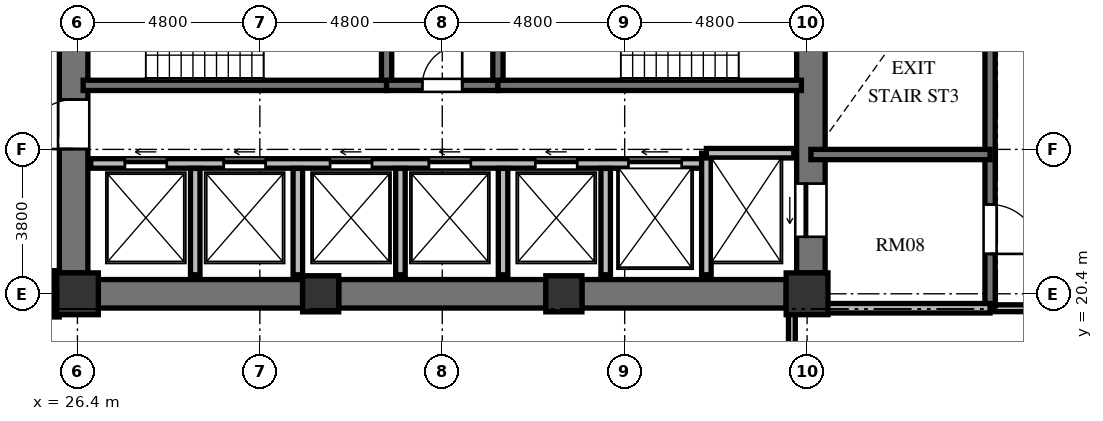
"""IFC4 building model, lengths in metres.
Left out: names, types, materials, properties, quantities, classifications, styles, units other than length and angle.
Written with IfcOpenShell. Run it as: python <this file> out.ifc"""

import sys

from ifc_helpers import new_model, si_unit, direction, frame, frame_2d, origin, origin_2d, place, context, subcontext, project, spatial, rectangle, extrude, element, fill, save


model = new_model("IFC4")
c1 = context("Model", 3, precision=1e-05, world=origin(), true_north=direction((0.0, 1.0)))
c2 = subcontext(c1, "Body", "Model", "MODEL_VIEW")
j1 = project(units=[si_unit("LENGTHUNIT", "METRE"), si_unit("PLANEANGLEUNIT", "RADIAN")], contexts=[c1])
p1 = place(None, origin())
s1 = spatial("IfcSite", under=j1, at=p1, CompositionType="ELEMENT")
p2 = place(p1, origin())
s2 = spatial("IfcBuilding", under=s1, at=p2, CompositionType="ELEMENT")
p3 = place(p2, frame((0.0, 0.0, 125.52)))
s3 = spatial("IfcBuildingStorey", under=s2, at=p3, CompositionType="ELEMENT", Elevation=125.52)
p4 = place(p3, frame((26.4, 20.4, 0.0), z_axis=(0.0, 0.0, 1.0), x_axis=(1.0, 0.0, 0.0)))
e1 = element("IfcColumn", 1, at=p4, inside=s3, PredefinedType="COLUMN", context=c2, shape_type="SweptSolid", body=[
    extrude(rectangle(XDim=1.1, YDim=1.1, at=origin_2d()), origin(), (0.0, 0.0, 1.0), 3.648),
])
for number, where, z_axis, x_axis in (
    (2, (32.8, 20.4, 0.0), (0.0, 0.0, 1.0), (1.0, 0.0, 0.0)),
    (3, (39.2, 20.4, 0.0), (0.0, 0.0, 1.0), (1.0, 0.0, 0.0)),
):
    element("IfcColumn", number, at=place(p3, frame(where, z_axis=z_axis, x_axis=x_axis)), inside=s3, PredefinedType="COLUMN", context=c2, shape_type="SweptSolid", body=[
        extrude(rectangle(XDim=0.95, YDim=0.95, at=origin_2d()), origin(), (0.0, 0.0, 1.0), 3.648),
    ])
p5 = place(p3, frame((45.6, 20.4, 0.0), z_axis=(0.0, 0.0, 1.0), x_axis=(1.0, 0.0, 0.0)))
e4 = element("IfcColumn", 4, at=p5, inside=s3, PredefinedType="COLUMN", context=c2, shape_type="SweptSolid", body=[
    extrude(rectangle(XDim=1.1, YDim=1.1, at=origin_2d()), origin(), (0.0, 0.0, 1.0), 3.648),
])
p6 = place(p3, frame((26.3, 20.95, 0.0), z_axis=(0.0, 0.0, 1.0), x_axis=(0.0, 1.0, 0.0)))
e5 = element("IfcWall", 5, at=p6, inside=s3, PredefinedType="SHEAR", context=c2, shape_type="SweptSolid", body=[
    extrude(rectangle(XDim=14.1, YDim=0.75, at=frame_2d((7.05, 0.0))), origin(), (0.0, 0.0, 1.0), 3.648),
])
p7 = place(p6, frame((6.5, 0.0, 0.0)))
e6 = element("IfcOpeningElement", 6, at=p7, cuts=e5, PredefinedType="OPENING", context=c2, shape_type="SweptSolid", body=[
    extrude(rectangle(XDim=1.2, YDim=2.15, at=frame_2d((0.6, 1.075))), frame((0.0, 0.385, 0.0), z_axis=(0.0, -1.0, 0.0), x_axis=(1.0, 0.0, 0.0)), (0.0, 0.0, 1.0), 0.77),
])
p8 = place(p6, frame((9.6, 0.0, 0.0)))
e7 = element("IfcOpeningElement", 7, at=p8, cuts=e5, PredefinedType="OPENING", context=c2, shape_type="SweptSolid", body=[
    extrude(rectangle(XDim=1.3, YDim=2.2, at=frame_2d((0.65, 1.1))), frame((0.0, 0.385, 0.0), z_axis=(0.0, -1.0, 0.0), x_axis=(1.0, 0.0, 0.0)), (0.0, 0.0, 1.0), 0.77),
])
p9 = place(p6, frame((3.26, 0.0, 0.0)))
e8 = element("IfcOpeningElement", 8, at=p9, cuts=e5, PredefinedType="OPENING", context=c2, shape_type="SweptSolid", body=[
    extrude(rectangle(XDim=1.3, YDim=2.2, at=frame_2d((0.65, 1.1))), frame((0.0, 0.385, 0.0), z_axis=(0.0, -1.0, 0.0), x_axis=(1.0, 0.0, 0.0)), (0.0, 0.0, 1.0), 0.77),
])
p10 = place(p3, frame((45.7, 20.95, 0.0), z_axis=(0.0, 0.0, 1.0), x_axis=(0.0, 1.0, 0.0)))
e9 = element("IfcWall", 9, at=p10, inside=s3, PredefinedType="SHEAR", context=c2, shape_type="SweptSolid", body=[
    extrude(rectangle(XDim=14.1, YDim=0.75, at=frame_2d((7.05, 0.0))), origin(), (0.0, 0.0, 1.0), 3.648),
])
p11 = place(p10, frame((11.75, 0.0, 0.0)))
e10 = element("IfcOpeningElement", 10, at=p11, cuts=e9, PredefinedType="OPENING", context=c2, shape_type="SweptSolid", body=[
    extrude(rectangle(XDim=1.4, YDim=2.3, at=frame_2d((0.7, 1.15))), frame((0.0, 0.385, 0.0), z_axis=(0.0, -1.0, 0.0), x_axis=(1.0, 0.0, 0.0)), (0.0, 0.0, 1.0), 0.77),
])
p12 = place(p10, frame((0.95, 0.0, 0.0)))
e11 = element("IfcOpeningElement", 11, at=p12, cuts=e9, PredefinedType="OPENING", context=c2, shape_type="SweptSolid", body=[
    extrude(rectangle(XDim=1.4, YDim=2.3, at=frame_2d((0.7, 1.15))), frame((0.0, 0.385, 0.0), z_axis=(0.0, -1.0, 0.0), x_axis=(1.0, 0.0, 0.0)), (0.0, 0.0, 1.0), 0.77),
])
p13 = place(p3, frame((26.95, 20.4, 0.0), z_axis=(0.0, 0.0, 1.0), x_axis=(1.0, 0.0, 0.0)))
e12 = element("IfcWall", 12, at=p13, inside=s3, PredefinedType="SHEAR", context=c2, shape_type="SweptSolid", body=[
    extrude(rectangle(XDim=5.375, YDim=0.75, at=frame_2d((2.688, 0.0))), origin(), (0.0, 0.0, 1.0), 3.648),
])
p14 = place(p3, frame((33.275, 20.4, 0.0), z_axis=(0.0, 0.0, 1.0), x_axis=(1.0, 0.0, 0.0)))
e13 = element("IfcWall", 13, at=p14, inside=s3, PredefinedType="SHEAR", context=c2, shape_type="SweptSolid", body=[
    extrude(rectangle(XDim=5.45, YDim=0.75, at=frame_2d((2.725, 0.0))), origin(), (0.0, 0.0, 1.0), 3.648),
])
p15 = place(p3, frame((39.675, 20.4, 0.0), z_axis=(0.0, 0.0, 1.0), x_axis=(1.0, 0.0, 0.0)))
e14 = element("IfcWall", 14, at=p15, inside=s3, PredefinedType="SHEAR", context=c2, shape_type="SweptSolid", body=[
    extrude(rectangle(XDim=5.375, YDim=0.75, at=frame_2d((2.688, 0.0))), origin(), (0.0, 0.0, 1.0), 3.648),
])
p16 = place(p3, frame((26.55, 25.885, 0.0), z_axis=(0.0, 0.0, 1.0), x_axis=(1.0, 0.0, 0.0)))
e15 = element("IfcWall", 15, at=p16, inside=s3, PredefinedType="SHEAR", context=c2, shape_type="SweptSolid", body=[
    extrude(rectangle(XDim=7.985, YDim=0.27, at=frame_2d((3.992, 0.0))), origin(), (0.0, 0.0, 1.0), 3.648),
])
p17 = place(p3, frame((34.535, 25.885, 0.0), z_axis=(0.0, 0.0, 1.0), x_axis=(1.0, 0.0, 0.0)))
e16 = element("IfcWall", 16, at=p17, inside=s3, PredefinedType="SHEAR", context=c2, shape_type="SweptSolid", body=[
    extrude(rectangle(XDim=2.93, YDim=0.27, at=frame_2d((1.465, 0.0))), origin(), (0.0, 0.0, 1.0), 3.648),
])
p18 = place(p17, frame((0.94, 0.0, 0.0)))
e17 = element("IfcOpeningElement", 17, at=p18, cuts=e16, PredefinedType="OPENING", context=c2, shape_type="SweptSolid", body=[
    extrude(rectangle(XDim=1.05, YDim=2.15, at=frame_2d((0.525, 1.075))), frame((0.0, 0.145, 0.0), z_axis=(0.0, -1.0, 0.0), x_axis=(1.0, 0.0, 0.0)), (0.0, 0.0, 1.0), 0.29),
])
p19 = place(p3, frame((37.465, 25.885, 0.0), z_axis=(0.0, 0.0, 1.0), x_axis=(1.0, 0.0, 0.0)))
e18 = element("IfcWall", 18, at=p19, inside=s3, PredefinedType="SHEAR", context=c2, shape_type="SweptSolid", body=[
    extrude(rectangle(XDim=7.985, YDim=0.27, at=frame_2d((3.992, 0.0))), origin(), (0.0, 0.0, 1.0), 3.648),
])
for number, where, z_axis, x_axis in (
    (19, (34.535, 26.02, 0.0), (0.0, 0.0, 1.0), (0.0, 1.0, 0.0)),
    (20, (37.465, 26.02, 0.0), (0.0, 0.0, 1.0), (0.0, 1.0, 0.0)),
):
    element("IfcWall", number, at=place(p3, frame(where, z_axis=z_axis, x_axis=x_axis)), inside=s3, PredefinedType="SHEAR", context=c2, shape_type="SweptSolid", body=[
        extrude(rectangle(XDim=4.08, YDim=0.27, at=frame_2d((2.04, 0.0))), origin(), (0.0, 0.0, 1.0), 3.648),
    ])
p20 = place(p3, frame((26.75, 23.83, 0.0), z_axis=(0.0, 0.0, 1.0), x_axis=(1.0, 0.0, 0.0)))
e21 = element("IfcWall", 21, at=p20, inside=s3, PredefinedType="SOLIDWALL", context=c2, shape_type="SweptSolid", body=[
    extrude(rectangle(XDim=16.2, YDim=0.25, at=frame_2d((8.1, 0.0))), origin(), (0.0, 0.0, 1.0), 3.428),
])
p21 = place(p20, frame((0.9, 0.0, 0.0)))
e22 = element("IfcOpeningElement", 22, at=p21, cuts=e21, PredefinedType="OPENING", context=c2, shape_type="SweptSolid", body=[
    extrude(rectangle(XDim=1.1, YDim=2.2, at=frame_2d((0.55, 1.1))), frame((0.0, 0.135, 0.0), z_axis=(0.0, -1.0, 0.0), x_axis=(1.0, 0.0, 0.0)), (0.0, 0.0, 1.0), 0.27),
])
p22 = place(p20, frame((3.5, 0.0, 0.0)))
e23 = element("IfcOpeningElement", 23, at=p22, cuts=e21, PredefinedType="OPENING", context=c2, shape_type="SweptSolid", body=[
    extrude(rectangle(XDim=1.1, YDim=2.2, at=frame_2d((0.55, 1.1))), frame((0.0, 0.135, 0.0), z_axis=(0.0, -1.0, 0.0), x_axis=(1.0, 0.0, 0.0)), (0.0, 0.0, 1.0), 0.27),
])
p23 = place(p20, frame((6.3, 0.0, 0.0)))
e24 = element("IfcOpeningElement", 24, at=p23, cuts=e21, PredefinedType="OPENING", context=c2, shape_type="SweptSolid", body=[
    extrude(rectangle(XDim=1.1, YDim=2.2, at=frame_2d((0.55, 1.1))), frame((0.0, 0.135, 0.0), z_axis=(0.0, -1.0, 0.0), x_axis=(1.0, 0.0, 0.0)), (0.0, 0.0, 1.0), 0.27),
])
p24 = place(p20, frame((8.9, 0.0, 0.0)))
e25 = element("IfcOpeningElement", 25, at=p24, cuts=e21, PredefinedType="OPENING", context=c2, shape_type="SweptSolid", body=[
    extrude(rectangle(XDim=1.1, YDim=2.2, at=frame_2d((0.55, 1.1))), frame((0.0, 0.135, 0.0), z_axis=(0.0, -1.0, 0.0), x_axis=(1.0, 0.0, 0.0)), (0.0, 0.0, 1.0), 0.27),
])
p25 = place(p20, frame((11.7, 0.0, 0.0)))
e26 = element("IfcOpeningElement", 26, at=p25, cuts=e21, PredefinedType="OPENING", context=c2, shape_type="SweptSolid", body=[
    extrude(rectangle(XDim=1.1, YDim=2.2, at=frame_2d((0.55, 1.1))), frame((0.0, 0.135, 0.0), z_axis=(0.0, -1.0, 0.0), x_axis=(1.0, 0.0, 0.0)), (0.0, 0.0, 1.0), 0.27),
])
p26 = place(p20, frame((14.15, 0.0, 0.0)))
e27 = element("IfcOpeningElement", 27, at=p26, cuts=e21, PredefinedType="OPENING", context=c2, shape_type="SweptSolid", body=[
    extrude(rectangle(XDim=1.4, YDim=2.3, at=frame_2d((0.7, 1.15))), frame((0.0, 0.135, 0.0), z_axis=(0.0, -1.0, 0.0), x_axis=(1.0, 0.0, 0.0)), (0.0, 0.0, 1.0), 0.27),
])
p27 = place(p3, frame((42.95, 20.9, 0.0), z_axis=(0.0, 0.0, 1.0), x_axis=(0.0, 1.0, 0.0)))
e28 = element("IfcWall", 28, at=p27, inside=s3, PredefinedType="SOLIDWALL", context=c2, shape_type="SweptSolid", body=[
    extrude(rectangle(XDim=3.2, YDim=0.25, at=frame_2d((1.6, 0.0))), origin(), (0.0, 0.0, 1.0), 3.428),
])
p28 = place(p3, frame((42.95, 24.1, 0.0), z_axis=(0.0, 0.0, 1.0), x_axis=(1.0, 0.0, 0.0)))
e29 = element("IfcWall", 29, at=p28, inside=s3, PredefinedType="SOLIDWALL", context=c2, shape_type="SweptSolid", body=[
    extrude(rectangle(XDim=2.3, YDim=0.25, at=frame_2d((1.15, 0.0))), origin(), (0.0, 0.0, 1.0), 3.428),
])
for number, where, z_axis, x_axis in (
    (30, (29.5, 20.9, 0.0), (0.0, 0.0, 1.0), (0.0, 1.0, 0.0)),
    (31, (32.2, 20.9, 0.0), (0.0, 0.0, 1.0), (0.0, 1.0, 0.0)),
    (32, (34.9, 20.9, 0.0), (0.0, 0.0, 1.0), (0.0, 1.0, 0.0)),
    (33, (37.6, 20.9, 0.0), (0.0, 0.0, 1.0), (0.0, 1.0, 0.0)),
    (34, (40.3, 20.9, 0.0), (0.0, 0.0, 1.0), (0.0, 1.0, 0.0)),
):
    element("IfcWall", number, at=place(p3, frame(where, z_axis=z_axis, x_axis=x_axis)), inside=s3, PredefinedType="SOLIDWALL", context=c2, shape_type="SweptSolid", body=[
        extrude(rectangle(XDim=2.8, YDim=0.25, at=frame_2d((1.4, 0.0))), origin(), (0.0, 0.0, 1.0), 3.428),
    ])
p29 = place(p3, frame((50.415, 35.845, 0.0), z_axis=(0.0, 0.0, 1.0), x_axis=(0.0, -1.0, 0.0)))
e35 = element("IfcWall", 35, at=p29, inside=s3, PredefinedType="SHEAR", context=c2, shape_type="SweptSolid", body=[
    extrude(rectangle(XDim=15.825, YDim=0.27, at=frame_2d((7.913, 0.0))), origin(), (0.0, 0.0, 1.0), 3.648),
])
p30 = place(p29, frame((4.445, 0.0, 0.0)))
e36 = element("IfcOpeningElement", 36, at=p30, cuts=e35, PredefinedType="OPENING", context=c2, shape_type="SweptSolid", body=[
    extrude(rectangle(XDim=1.2, YDim=2.15, at=frame_2d((0.6, 1.075))), frame((0.0, 0.145, 0.0), z_axis=(0.0, -1.0, 0.0), x_axis=(1.0, 0.0, 0.0)), (0.0, 0.0, 1.0), 0.29),
])
p31 = place(p29, frame((1.295, 0.0, 0.0)))
e37 = element("IfcOpeningElement", 37, at=p31, cuts=e35, PredefinedType="OPENING", context=c2, shape_type="SweptSolid", body=[
    extrude(rectangle(XDim=1.3, YDim=2.2, at=frame_2d((0.65, 1.1))), frame((0.0, 0.145, 0.0), z_axis=(0.0, -1.0, 0.0), x_axis=(1.0, 0.0, 0.0)), (0.0, 0.0, 1.0), 0.29),
])
p32 = place(p29, frame((13.095, 0.0, 0.0)))
e38 = element("IfcOpeningElement", 38, at=p32, cuts=e35, PredefinedType="OPENING", context=c2, shape_type="SweptSolid", body=[
    extrude(rectangle(XDim=1.3, YDim=2.2, at=frame_2d((0.65, 1.1))), frame((0.0, 0.145, 0.0), z_axis=(0.0, -1.0, 0.0), x_axis=(1.0, 0.0, 0.0)), (0.0, 0.0, 1.0), 0.29),
])
p33 = place(p3, frame((45.7, 24.065, 0.0), z_axis=(0.0, 0.0, 1.0), x_axis=(1.0, 0.0, 0.0)))
e39 = element("IfcWall", 39, at=p33, inside=s3, PredefinedType="SHEAR", context=c2, shape_type="SweptSolid", body=[
    extrude(rectangle(XDim=4.715, YDim=0.27, at=frame_2d((2.357, 0.0))), origin(), (0.0, 0.0, 1.0), 3.648),
])
p34 = place(p3, frame((45.7, 20.02, 0.0), z_axis=(0.0, 0.0, 1.0), x_axis=(1.0, 0.0, 0.0)))
e40 = element("IfcWall", 40, at=p34, inside=s3, PredefinedType="SOLIDWALL", context=c2, shape_type="SweptSolid", body=[
    extrude(rectangle(XDim=4.715, YDim=0.25, at=frame_2d((2.357, 0.0))), origin(), (0.0, 0.0, 1.0), 3.428),
])
p35 = place(p3, frame((53.19, 20.02, 0.0), z_axis=(0.0, 0.0, 1.0), x_axis=(-1.0, 0.0, 0.0)))
e41 = element("IfcWall", 41, at=p35, inside=s3, PredefinedType="PARTITIONING", context=c2, shape_type="SweptSolid", body=[
    extrude(rectangle(XDim=2.65, YDim=0.18, at=frame_2d((1.325, 0.0))), origin(), (0.0, 0.0, 1.0), 3.428),
])
p36 = place(p3, frame((25.83, 21.01, 0.0), z_axis=(0.0, 0.0, 1.0), x_axis=(0.0, -1.0, 0.0)))
e42 = element("IfcWall", 42, at=p36, inside=s3, PredefinedType="PARTITIONING", context=c2, shape_type="SweptSolid", body=[
    extrude(rectangle(XDim=1.22, YDim=0.18, at=frame_2d((0.61, 0.0))), origin(), (0.0, 0.0, 1.0), 3.428),
])
p37 = place(p3, frame((45.2, 19.91, 0.0), z_axis=(0.0, 0.0, 1.0), x_axis=(0.0, -1.0, 0.0)))
e43 = element("IfcWall", 43, at=p37, inside=s3, PredefinedType="PARTITIONING", context=c2, shape_type="SweptSolid", body=[
    extrude(rectangle(XDim=2.55, YDim=0.18, at=frame_2d((1.275, 0.0))), origin(), (0.0, 0.0, 1.0), 3.428),
])
p38 = place(p18, origin())
e44 = element("IfcDoor", 44, at=p38, inside=s3, OperationType="SINGLE_SWING_RIGHT", PredefinedType="DOOR", context=c2, shape_type="SweptSolid", body=[
    extrude(rectangle(XDim=1.05, YDim=2.15, at=frame_2d((0.525, 1.075))), frame((0.0, 0.025, 0.0), z_axis=(0.0, -1.0, 0.0), x_axis=(1.0, 0.0, 0.0)), (0.0, 0.0, 1.0), 0.05),
])
fill(e17, e44)
p39 = place(p9, origin())
e45 = element("IfcDoor", 45, at=p39, inside=s3, OperationType="SINGLE_SWING_LEFT", PredefinedType="DOOR", context=c2, shape_type="SweptSolid", body=[
    extrude(rectangle(XDim=1.3, YDim=2.2, at=frame_2d((0.65, 1.1))), frame((0.0, 0.025, 0.0), z_axis=(0.0, -1.0, 0.0), x_axis=(1.0, 0.0, 0.0)), (0.0, 0.0, 1.0), 0.05),
])
fill(e8, e45)
p40 = place(p21, origin())
e46 = element("IfcDoor", 46, at=p40, inside=s3, OperationType="SLIDING_TO_LEFT", PredefinedType="DOOR", context=c2, shape_type="SweptSolid", body=[
    extrude(rectangle(XDim=1.1, YDim=2.2, at=frame_2d((0.55, 1.1))), frame((0.0, 0.025, 0.0), z_axis=(0.0, -1.0, 0.0), x_axis=(1.0, 0.0, 0.0)), (0.0, 0.0, 1.0), 0.05),
])
fill(e22, e46)
p41 = place(p22, origin())
e47 = element("IfcDoor", 47, at=p41, inside=s3, OperationType="SLIDING_TO_LEFT", PredefinedType="DOOR", context=c2, shape_type="SweptSolid", body=[
    extrude(rectangle(XDim=1.1, YDim=2.2, at=frame_2d((0.55, 1.1))), frame((0.0, 0.025, 0.0), z_axis=(0.0, -1.0, 0.0), x_axis=(1.0, 0.0, 0.0)), (0.0, 0.0, 1.0), 0.05),
])
fill(e23, e47)
p42 = place(p23, origin())
e48 = element("IfcDoor", 48, at=p42, inside=s3, OperationType="SLIDING_TO_LEFT", PredefinedType="DOOR", context=c2, shape_type="SweptSolid", body=[
    extrude(rectangle(XDim=1.1, YDim=2.2, at=frame_2d((0.55, 1.1))), frame((0.0, 0.025, 0.0), z_axis=(0.0, -1.0, 0.0), x_axis=(1.0, 0.0, 0.0)), (0.0, 0.0, 1.0), 0.05),
])
fill(e24, e48)
p43 = place(p24, origin())
e49 = element("IfcDoor", 49, at=p43, inside=s3, OperationType="SLIDING_TO_LEFT", PredefinedType="DOOR", context=c2, shape_type="SweptSolid", body=[
    extrude(rectangle(XDim=1.1, YDim=2.2, at=frame_2d((0.55, 1.1))), frame((0.0, 0.025, 0.0), z_axis=(0.0, -1.0, 0.0), x_axis=(1.0, 0.0, 0.0)), (0.0, 0.0, 1.0), 0.05),
])
fill(e25, e49)
p44 = place(p25, origin())
e50 = element("IfcDoor", 50, at=p44, inside=s3, OperationType="SLIDING_TO_LEFT", PredefinedType="DOOR", context=c2, shape_type="SweptSolid", body=[
    extrude(rectangle(XDim=1.1, YDim=2.2, at=frame_2d((0.55, 1.1))), frame((0.0, 0.025, 0.0), z_axis=(0.0, -1.0, 0.0), x_axis=(1.0, 0.0, 0.0)), (0.0, 0.0, 1.0), 0.05),
])
fill(e26, e50)
p45 = place(p12, origin())
e51 = element("IfcDoor", 51, at=p45, inside=s3, OperationType="SLIDING_TO_LEFT", PredefinedType="DOOR", context=c2, shape_type="SweptSolid", body=[
    extrude(rectangle(XDim=1.4, YDim=2.3, at=frame_2d((0.7, 1.15))), frame((0.0, 0.025, 0.0), z_axis=(0.0, -1.0, 0.0), x_axis=(1.0, 0.0, 0.0)), (0.0, 0.0, 1.0), 0.05),
])
fill(e11, e51)
p46 = place(p26, origin())
e52 = element("IfcDoor", 52, at=p46, inside=s3, OperationType="SLIDING_TO_LEFT", PredefinedType="DOOR", context=c2, shape_type="SweptSolid", body=[
    extrude(rectangle(XDim=1.4, YDim=2.3, at=frame_2d((0.7, 1.15))), frame((0.0, 0.025, 0.0), z_axis=(0.0, -1.0, 0.0), x_axis=(1.0, 0.0, 0.0)), (0.0, 0.0, 1.0), 0.05),
])
fill(e27, e52)
p47 = place(p32, origin())
e53 = element("IfcDoor", 53, at=p47, inside=s3, OperationType="SINGLE_SWING_RIGHT", PredefinedType="DOOR", context=c2, shape_type="SweptSolid", body=[
    extrude(rectangle(XDim=1.3, YDim=2.2, at=frame_2d((0.65, 1.1))), frame((0.0, 0.025, 0.0), z_axis=(0.0, -1.0, 0.0), x_axis=(1.0, 0.0, 0.0)), (0.0, 0.0, 1.0), 0.05),
])
fill(e38, e53)
save(model, sys.argv[1])
